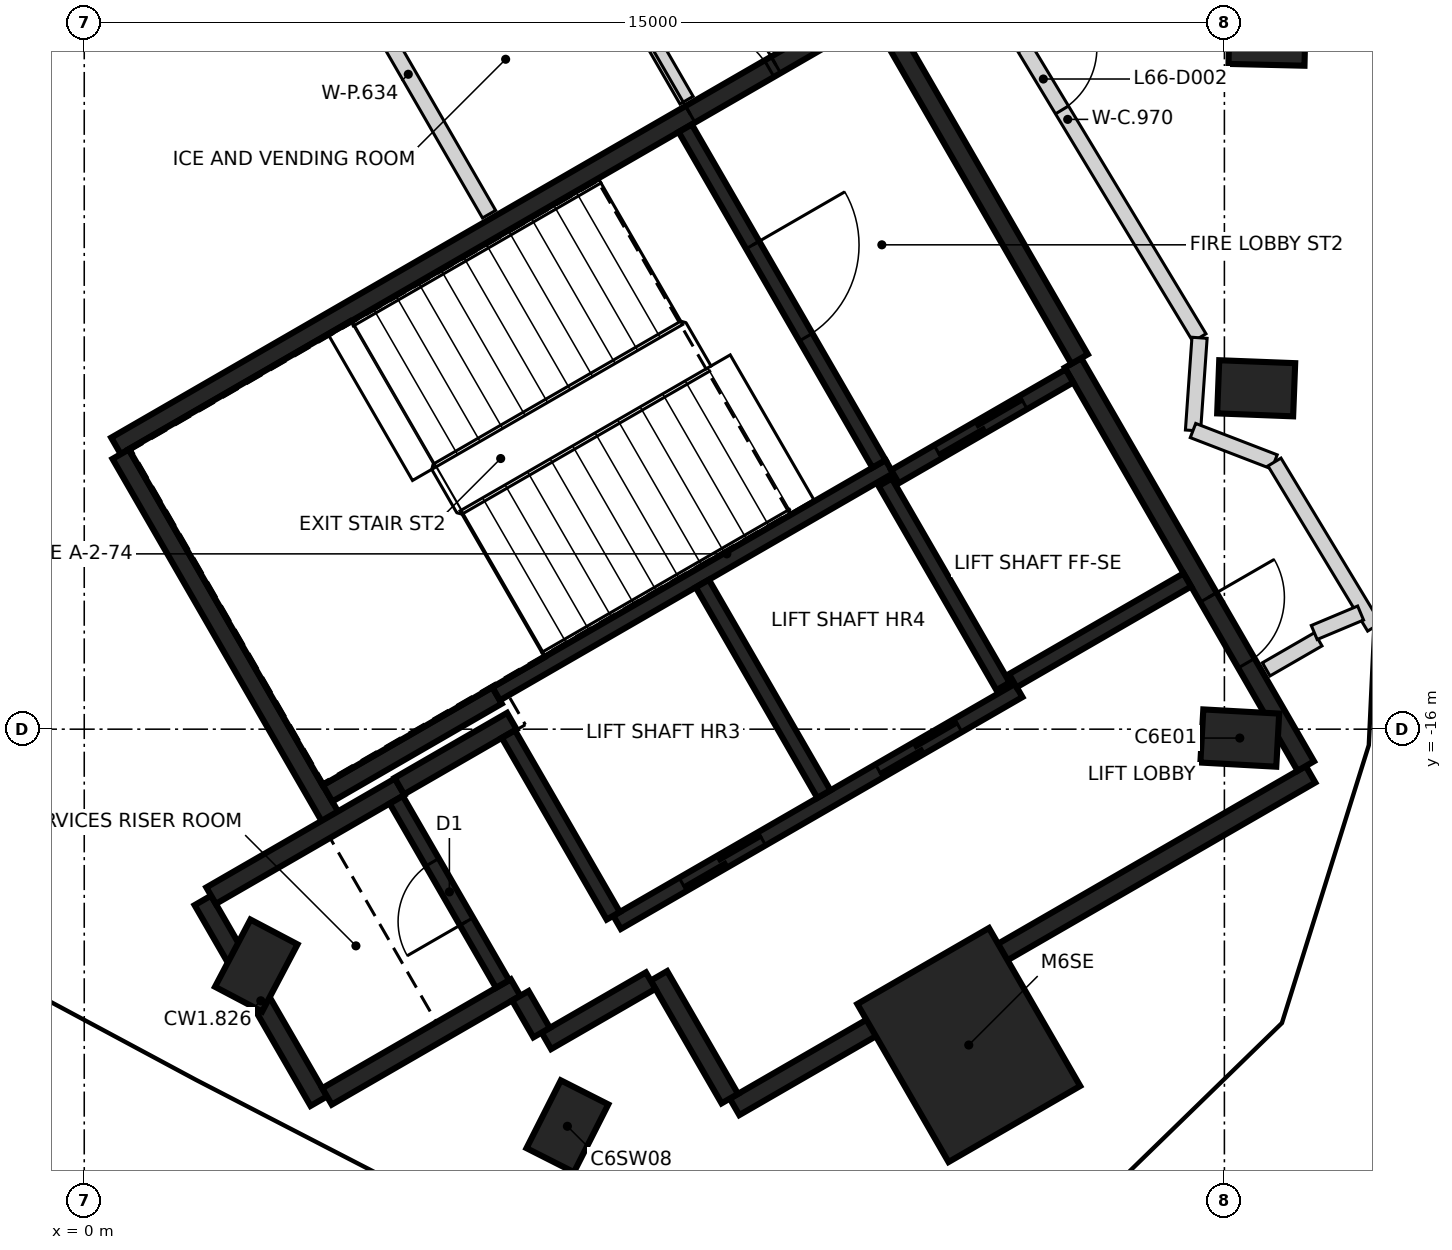
"""IFC4 building model, lengths in metres.
Left out: names, types, materials, properties, quantities, classifications, styles, units other than length and angle.
Written with IfcOpenShell. Run it as: python <this file> out.ifc"""

import sys

from ifc_helpers import new_model, si_unit, direction, frame, frame_2d, origin, origin_2d, place, context, subcontext, project, spatial, rectangle, extrude, element, fill, save


model = new_model("IFC4")
c1 = context("Model", 3, precision=1e-05, world=origin(), true_north=direction((0.0, 1.0)))
c2 = subcontext(c1, "Body", "Model", "MODEL_VIEW")
j1 = project(units=[si_unit("LENGTHUNIT", "METRE"), si_unit("PLANEANGLEUNIT", "RADIAN")], contexts=[c1])
p1 = place(None, origin())
s1 = spatial("IfcSite", under=j1, at=p1, CompositionType="ELEMENT")
p2 = place(p1, origin())
s2 = spatial("IfcBuilding", under=s1, at=p2, CompositionType="ELEMENT")
p3 = place(p2, frame((0.0, 0.0, 262.2)))
s3 = spatial("IfcBuildingStorey", under=s2, at=p3, CompositionType="ELEMENT", Elevation=262.2)
for number, where, z_axis, x_axis in (
    (1, (15.202, -16.117, -0.35), (0.0, 0.0, 1.0), (-0.998, 0.055, 0.0)),
    (2, (15.418, -11.515, -0.35), (0.0, 0.0, 1.0), (-0.999, 0.039, 0.0)),
    (3, (15.562, -6.91, -0.35), (0.0, 0.0, 1.0), (-1.0, 0.024, 0.0)),
    (4, (2.263, -19.11, -0.35), (0.0, 0.0, 1.0), (0.466, 0.885, 0.0)),
    (5, (6.356, -21.224, -0.35), (0.0, 0.0, 1.0), (0.452, 0.892, 0.0)),
):
    element("IfcColumn", number, at=place(p3, frame(where, z_axis=z_axis, x_axis=x_axis)), inside=s3, PredefinedType="COLUMN", context=c2, shape_type="SweptSolid", body=[
        extrude(rectangle(XDim=1.0, YDim=0.7, at=origin_2d()), origin(), (0.0, 0.0, 1.0), 3.6),
    ])
p4 = place(p3, frame((11.637, -20.155, -0.35), z_axis=(0.0, 0.0, 1.0), x_axis=(-0.5, 0.866025403784, 0.0)))
e6 = element("IfcColumn", 6, at=p4, inside=s3, PredefinedType="COLUMN", context=c2, shape_type="SweptSolid", body=[
    extrude(rectangle(XDim=2.4, YDim=2.0, at=origin_2d()), origin(), (0.0, 0.0, 1.0), 3.6),
])
p5 = place(p3, frame((0.417, -12.273, 0.0), z_axis=(0.0, 0.0, 1.0), x_axis=(0.866021906294, 0.500006057782, 0.0)))
e7 = element("IfcWall", 7, at=p5, inside=s3, PredefinedType="SHEAR", context=c2, shape_type="SweptSolid", body=[
    extrude(rectangle(XDim=11.55, YDim=0.25, at=frame_2d((5.775, 0.0))), origin(), (0.0, 0.0, 1.0), 3.25),
])
p6 = place(p5, frame((10.025, 0.0, 0.0)))
e8 = element("IfcOpeningElement", 8, at=p6, cuts=e7, PredefinedType="OPENING", context=c2, shape_type="SweptSolid", body=[
    extrude(rectangle(XDim=1.2, YDim=2.1, at=frame_2d((0.6, 1.05))), frame((0.0, 0.135, 0.0), z_axis=(0.0, -1.0, 0.0), x_axis=(1.0, 0.0, 0.0)), (0.0, 0.0, 1.0), 0.27),
])
p7 = place(p5, frame((8.725, 0.0, 0.0)))
e9 = element("IfcOpeningElement", 9, at=p7, cuts=e7, PredefinedType="OPENING", context=c2, shape_type="SweptSolid", body=[
    extrude(rectangle(XDim=1.2, YDim=2.1, at=frame_2d((0.6, 1.05))), frame((0.0, 0.135, 0.0), z_axis=(0.0, -1.0, 0.0), x_axis=(1.0, 0.0, 0.0)), (0.0, 0.0, 1.0), 0.27),
])
p8 = place(p3, frame((16.133, -16.594, 0.0), z_axis=(0.0, 0.0, 1.0), x_axis=(-0.866022959057, -0.500004234368, 0.0)))
e10 = element("IfcWall", 10, at=p8, inside=s3, PredefinedType="SHEAR", context=c2, shape_type="SweptSolid", body=[
    extrude(rectangle(XDim=8.75, YDim=0.25, at=frame_2d((4.375, 0.0))), origin(), (0.0, 0.0, 1.0), 3.25),
])
p9 = place(p3, frame((13.008, -11.181, 0.0), z_axis=(0.0, 0.0, 1.0), x_axis=(0.500001955336, -0.866024274868, 0.0)))
e11 = element("IfcWall", 11, at=p9, inside=s3, PredefinedType="SHEAR", context=c2, shape_type="SweptSolid", body=[
    extrude(rectangle(XDim=6.125, YDim=0.25, at=frame_2d((3.062, 0.0))), origin(), (0.0, 0.0, 1.0), 3.25),
])
p10 = place(p9, frame((3.563, 0.0, 0.0)))
e12 = element("IfcOpeningElement", 12, at=p10, cuts=e11, PredefinedType="OPENING", context=c2, shape_type="SweptSolid", body=[
    extrude(rectangle(XDim=1.0, YDim=2.1, at=frame_2d((0.5, 1.05))), frame((0.0, 0.135, 0.0), z_axis=(0.0, -1.0, 0.0), x_axis=(1.0, 0.0, 0.0)), (0.0, 0.0, 1.0), 0.27),
])
p11 = place(p3, frame((3.235, -17.153, 0.0), z_axis=(0.0, 0.0, 1.0), x_axis=(-0.500008851346, 0.866020293397, 0.0)))
e13 = element("IfcWall", 13, at=p11, inside=s3, PredefinedType="SHEAR", context=c2, shape_type="SweptSolid", body=[
    extrude(rectangle(XDim=5.51, YDim=0.25, at=frame_2d((2.755, 0.0))), origin(), (0.0, 0.0, 1.0), 3.25),
])
p12 = place(p3, frame((10.483, -6.606, 0.0), z_axis=(0.0, 0.0, 1.0), x_axis=(0.49999885962, -0.866026062182, 0.0)))
e14 = element("IfcWall", 14, at=p12, inside=s3, PredefinedType="SHEAR", context=c2, shape_type="SweptSolid", body=[
    extrude(rectangle(XDim=5.225, YDim=0.25, at=frame_2d((2.612, 0.0))), origin(), (0.0, 0.0, 1.0), 3.25),
])
p13 = place(p3, frame((3.085, -20.894, 0.0), z_axis=(0.0, 0.0, 1.0), x_axis=(-0.499978833458, 0.866037623948, 0.0)))
e15 = element("IfcWall", 15, at=p13, inside=s3, PredefinedType="SHEAR", context=c2, shape_type="SweptSolid", body=[
    extrude(rectangle(XDim=3.05, YDim=0.25, at=frame_2d((1.525, 0.0))), origin(), (0.0, 0.0, 1.0), 3.25),
])
p14 = place(p3, frame((1.669, -18.19, 0.0), z_axis=(0.0, 0.0, 1.0), x_axis=(0.866042235819, 0.499970844928, 0.0)))
e16 = element("IfcWall", 16, at=p14, inside=s3, PredefinedType="SHEAR", context=c2, shape_type="SweptSolid", body=[
    extrude(rectangle(XDim=2.865, YDim=0.25, at=frame_2d((1.432, 0.0))), origin(), (0.0, 0.0, 1.0), 3.25),
])
p15 = place(p3, frame((5.675, -19.399, 0.0), z_axis=(0.0, 0.0, 1.0), x_axis=(-0.866026637627, -0.499997862916, 0.0)))
e17 = element("IfcWall", 17, at=p15, inside=s3, PredefinedType="SHEAR", context=c2, shape_type="SweptSolid", body=[
    extrude(rectangle(XDim=2.865, YDim=0.25, at=frame_2d((1.432, 0.0))), origin(), (0.0, 0.0, 1.0), 3.25),
])
p16 = place(p3, frame((5.431, -15.556, 0.0), z_axis=(0.0, 0.0, 1.0), x_axis=(-0.866022940537, -0.500004266446, 0.0)))
e18 = element("IfcWall", 18, at=p16, inside=s3, PredefinedType="SHEAR", context=c2, shape_type="SweptSolid", body=[
    extrude(rectangle(XDim=2.575, YDim=0.25, at=frame_2d((1.287, 0.0))), origin(), (0.0, 0.0, 1.0), 3.25),
])
p17 = place(p3, frame((8.493, -20.86, 0.0), z_axis=(0.0, 0.0, 1.0), x_axis=(-0.500039802285, 0.866002422705, 0.0)))
e19 = element("IfcWall", 19, at=p17, inside=s3, PredefinedType="SHEAR", context=c2, shape_type="SweptSolid", body=[
    extrude(rectangle(XDim=1.865, YDim=0.25, at=frame_2d((0.932, 0.0))), origin(), (0.0, 0.0, 1.0), 3.25),
])
p18 = place(p3, frame((4.145, -16.749, 0.0), z_axis=(0.0, 0.0, 1.0), x_axis=(0.866038183914, 0.499977863513, 0.0)))
e20 = element("IfcWall", 20, at=p18, inside=s3, PredefinedType="SHEAR", context=c2, shape_type="SweptSolid", body=[
    extrude(rectangle(XDim=1.71, YDim=0.25, at=frame_2d((0.855, 0.0))), origin(), (0.0, 0.0, 1.0), 3.25),
])
p19 = place(p3, frame((7.452, -19.308, 0.0), z_axis=(0.0, 0.0, 1.0), x_axis=(-0.866044474677, -0.49996696679, 0.0)))
e21 = element("IfcWall", 21, at=p19, inside=s3, PredefinedType="SHEAR", context=c2, shape_type="SweptSolid", body=[
    extrude(rectangle(XDim=1.584, YDim=0.25, at=frame_2d((0.792, 0.0))), origin(), (0.0, 0.0, 1.0), 3.25),
])
p20 = place(p3, frame((6.017, -19.992, 0.0), z_axis=(0.0, 0.0, 1.0), x_axis=(-0.500364886717, 0.865814633822, 0.0)))
e22 = element("IfcWall", 22, at=p20, inside=s3, PredefinedType="SHEAR", context=c2, shape_type="SweptSolid", body=[
    extrude(rectangle(XDim=0.559, YDim=0.25, at=frame_2d((0.28, 0.0))), origin(), (0.0, 0.0, 1.0), 3.25),
])
p21 = place(p3, frame((5.419, -15.534, 0.0), z_axis=(0.0, 0.0, 1.0), x_axis=(0.866029065029, 0.499993658486, 0.0)))
e23 = element("IfcWall", 23, at=p21, inside=s3, PredefinedType="SHEAR", context=c2, shape_type="SweptSolid", body=[
    extrude(rectangle(XDim=5.974, YDim=0.2, at=frame_2d((2.987, 0.0))), origin(), (0.0, 0.0, 1.0), 3.25),
])
p22 = place(p3, frame((7.01, -18.542, 0.0), z_axis=(0.0, 0.0, 1.0), x_axis=(0.866030299012, 0.499991521122, 0.0)))
e24 = element("IfcWall", 24, at=p22, inside=s3, PredefinedType="SHEAR", context=c2, shape_type="SweptSolid", body=[
    extrude(rectangle(XDim=6.1, YDim=0.2, at=frame_2d((3.05, 0.0))), origin(), (0.0, 0.0, 1.0), 3.25),
])
p23 = place(p22, frame((1.0, 0.0, 0.0)))
e25 = element("IfcOpeningElement", 25, at=p23, cuts=e24, PredefinedType="OPENING", context=c2, shape_type="SweptSolid", body=[
    extrude(rectangle(XDim=1.2, YDim=2.1, at=frame_2d((0.6, 1.05))), frame((0.0, 0.11, 0.0), z_axis=(0.0, -1.0, 0.0), x_axis=(1.0, 0.0, 0.0)), (0.0, 0.0, 1.0), 0.22),
])
p24 = place(p22, frame((3.982, 0.0, 0.0)))
e26 = element("IfcOpeningElement", 26, at=p24, cuts=e24, PredefinedType="OPENING", context=c2, shape_type="SweptSolid", body=[
    extrude(rectangle(XDim=1.2, YDim=2.1, at=frame_2d((0.6, 1.05))), frame((0.0, 0.11, 0.0), z_axis=(0.0, -1.0, 0.0), x_axis=(1.0, 0.0, 0.0)), (0.0, 0.0, 1.0), 0.22),
])
p25 = place(p3, frame((7.906, -8.094, 0.0), z_axis=(0.0, 0.0, 1.0), x_axis=(0.500027839223, -0.866009330205, 0.0)))
e27 = element("IfcWall", 27, at=p25, inside=s3, PredefinedType="SHEAR", context=c2, shape_type="SweptSolid", body=[
    extrude(rectangle(XDim=5.098, YDim=0.2, at=frame_2d((2.549, 0.0))), origin(), (0.0, 0.0, 1.0), 3.25),
])
p26 = place(p25, frame((1.774, 0.0, 0.0)))
e28 = element("IfcOpeningElement", 28, at=p26, cuts=e27, PredefinedType="OPENING", context=c2, shape_type="SweptSolid", body=[
    extrude(rectangle(XDim=1.4, YDim=2.1, at=frame_2d((0.7, 1.05))), frame((0.0, 0.11, 0.0), z_axis=(0.0, -1.0, 0.0), x_axis=(1.0, 0.0, 0.0)), (0.0, 0.0, 1.0), 0.22),
])
p27 = place(p3, frame((8.132, -14.084, 0.0), z_axis=(0.0, 0.0, 1.0), x_axis=(0.499997778408, -0.866026686418, 0.0)))
e29 = element("IfcWall", 29, at=p27, inside=s3, PredefinedType="SHEAR", context=c2, shape_type="SweptSolid", body=[
    extrude(rectangle(XDim=3.198, YDim=0.2, at=frame_2d((1.599, 0.0))), origin(), (0.0, 0.0, 1.0), 3.25),
])
p28 = place(p3, frame((5.503, -19.352, 0.0), z_axis=(0.0, 0.0, 1.0), x_axis=(-0.499986818241, 0.866033014143, 0.0)))
e30 = element("IfcWall", 30, at=p28, inside=s3, PredefinedType="SHEAR", context=c2, shape_type="SweptSolid", body=[
    extrude(rectangle(XDim=2.798, YDim=0.2, at=frame_2d((1.399, 0.0))), origin(), (0.0, 0.0, 1.0), 3.25),
])
p29 = place(p28, frame((0.949, 0.0, 0.0)))
e31 = element("IfcOpeningElement", 31, at=p29, cuts=e30, PredefinedType="OPENING", context=c2, shape_type="SweptSolid", body=[
    extrude(rectangle(XDim=0.9, YDim=2.1, at=frame_2d((0.45, 1.05))), frame((0.0, 0.11, 0.0), z_axis=(0.0, -1.0, 0.0), x_axis=(1.0, 0.0, 0.0)), (0.0, 0.0, 1.0), 0.22),
])
p30 = place(p3, frame((6.96, -18.455, 0.0), z_axis=(0.0, 0.0, 1.0), x_axis=(-0.499926705758, 0.866067716099, 0.0)))
e32 = element("IfcWall", 32, at=p30, inside=s3, PredefinedType="SHEAR", context=c2, shape_type="SweptSolid", body=[
    extrude(rectangle(XDim=2.759, YDim=0.2, at=frame_2d((1.38, 0.0))), origin(), (0.0, 0.0, 1.0), 3.25),
])
p31 = place(p3, frame((12.088, -15.437, 0.0), z_axis=(0.0, 0.0, 1.0), x_axis=(-0.500026960575, 0.86600983753, 0.0)))
e33 = element("IfcWall", 33, at=p31, inside=s3, PredefinedType="SHEAR", context=c2, shape_type="SweptSolid", body=[
    extrude(rectangle(XDim=3.1, YDim=0.2, at=frame_2d((1.55, 0.0))), origin(), (0.0, 0.0, 1.0), 3.25),
])
p32 = place(p3, frame((10.666, -12.678, 0.0), z_axis=(0.0, 0.0, 1.0), x_axis=(0.866018407898, 0.500012117035, 0.0)))
e34 = element("IfcWall", 34, at=p32, inside=s3, PredefinedType="SHEAR", context=c2, shape_type="SweptSolid", body=[
    extrude(rectangle(XDim=2.651, YDim=0.2, at=frame_2d((1.325, 0.0))), origin(), (0.0, 0.0, 1.0), 3.25),
])
p33 = place(p32, frame((0.652, 0.0, 0.0)))
e35 = element("IfcOpeningElement", 35, at=p33, cuts=e34, PredefinedType="OPENING", context=c2, shape_type="SweptSolid", body=[
    extrude(rectangle(XDim=1.3, YDim=2.1, at=frame_2d((0.65, 1.05))), frame((0.0, 0.11, 0.0), z_axis=(0.0, -1.0, 0.0), x_axis=(1.0, 0.0, 0.0)), (0.0, 0.0, 1.0), 0.22),
])
p34 = place(p3, frame((14.512, -14.037, 0.0), z_axis=(0.0, 0.0, 1.0), x_axis=(-0.866018407898, -0.500012117035, 0.0)))
e36 = element("IfcWall", 36, at=p34, inside=s3, PredefinedType="SHEAR", context=c2, shape_type="SweptSolid", body=[
    extrude(rectangle(XDim=2.651, YDim=0.2, at=frame_2d((1.325, 0.0))), origin(), (0.0, 0.0, 1.0), 3.25),
])
p35 = place(p3, frame((7.427, -6.864, 0.0), z_axis=(0.0, 0.0, 1.0), x_axis=(0.499942098031, -0.866058830921, 0.0)))
e37 = element("IfcWall", 37, at=p35, inside=s3, PredefinedType="PARTITIONING", context=c2, shape_type="SweptSolid", body=[
    extrude(rectangle(XDim=0.994, YDim=0.2, at=frame_2d((0.497, 0.0))), origin(), (0.0, 0.0, 1.0), 3.25),
])
p36 = place(p3, frame((11.205, -5.105, 0.0), z_axis=(0.0, 0.0, 1.0), x_axis=(0.516682442017, -0.856177116087, 0.0)))
e38 = element("IfcWall", 38, at=p36, inside=s3, PredefinedType="PARTITIONING", context=c2, shape_type="SweptSolid", body=[
    extrude(rectangle(XDim=6.71, YDim=0.2, at=frame_2d((3.355, 0.0))), origin(), (0.0, 0.0, 1.0), 3.25),
])
p37 = place(p36, frame((2.26, 0.0, 0.0)))
e39 = element("IfcOpeningElement", 39, at=p37, cuts=e38, PredefinedType="OPENING", context=c2, shape_type="SweptSolid", body=[
    extrude(rectangle(XDim=0.95, YDim=2.1, at=frame_2d((0.475, 1.05))), frame((0.0, 0.11, 0.0), z_axis=(0.0, -1.0, 0.0), x_axis=(1.0, 0.0, 0.0)), (0.0, 0.0, 1.0), 0.22),
])
p38 = place(p3, frame((14.587, -12.071, 0.0), z_axis=(0.0, 0.0, 1.0), x_axis=(0.070466777423, 0.997514126857, 0.0)))
e40 = element("IfcWall", 40, at=p38, inside=s3, PredefinedType="PARTITIONING", context=c2, shape_type="SweptSolid", body=[
    extrude(rectangle(XDim=1.223, YDim=0.2, at=frame_2d((0.611, 0.0))), origin(), (0.0, 0.0, 1.0), 3.25),
])
p39 = place(p3, frame((14.587, -12.071, 0.0), z_axis=(0.0, 0.0, 1.0), x_axis=(0.933192153307, -0.359377802606, 0.0)))
e41 = element("IfcWall", 41, at=p39, inside=s3, PredefinedType="PARTITIONING", context=c2, shape_type="SweptSolid", body=[
    extrude(rectangle(XDim=1.149, YDim=0.2, at=frame_2d((0.574, 0.0))), origin(), (0.0, 0.0, 1.0), 2.35),
])
p40 = place(p3, frame((15.55, -15.213, 0.0), z_axis=(0.0, 0.0, 1.0), x_axis=(0.865989998118, 0.500061319399, 0.0)))
e42 = element("IfcWall", 42, at=p40, inside=s3, PredefinedType="PARTITIONING", context=c2, shape_type="SweptSolid", body=[
    extrude(rectangle(XDim=0.79, YDim=0.2, at=frame_2d((0.395, 0.0))), origin(), (0.0, 0.0, 1.0), 3.25),
])
p41 = place(p3, frame((15.659, -12.485, 0.0), z_axis=(0.0, 0.0, 1.0), x_axis=(0.516729412104, -0.856148769003, 0.0)))
e43 = element("IfcWall", 43, at=p41, inside=s3, PredefinedType="PARTITIONING", context=c2, shape_type="SweptSolid", body=[
    extrude(rectangle(XDim=2.538, YDim=0.2, at=frame_2d((1.269, 0.0))), origin(), (0.0, 0.0, 1.0), 3.25),
])
p42 = place(p3, frame((16.182, -14.728, 0.0), z_axis=(0.0, 0.0, 1.0), x_axis=(0.922058491377, 0.387050563207, 0.0)))
e44 = element("IfcWall", 44, at=p42, inside=s3, PredefinedType="PARTITIONING", context=c2, shape_type="SweptSolid", body=[
    extrude(rectangle(XDim=0.662, YDim=0.2, at=frame_2d((0.331, 0.0))), origin(), (0.0, 0.0, 1.0), 3.25),
])
p43 = place(p3, frame((3.2, -5.543, 0.0), z_axis=(0.0, 0.0, 1.0), x_axis=(0.500060428066, -0.865990512813, 0.0)))
e45 = element("IfcWall", 45, at=p43, inside=s3, PredefinedType="PARTITIONING", context=c2, shape_type="SweptSolid", body=[
    extrude(rectangle(XDim=4.252, YDim=0.2, at=frame_2d((2.126, 0.0))), origin(), (0.0, 0.0, 1.0), 3.25),
])
p44 = place(p33, origin())
e46 = element("IfcDoor", 46, at=p44, inside=s3, OperationType="SLIDING_TO_RIGHT", PredefinedType="DOOR", context=c2, shape_type="SweptSolid", body=[
    extrude(rectangle(XDim=1.3, YDim=2.1, at=frame_2d((0.65, 1.05))), frame((0.0, 0.025, 0.0), z_axis=(0.0, -1.0, 0.0), x_axis=(1.0, 0.0, 0.0)), (0.0, 0.0, 1.0), 0.05),
])
fill(e35, e46)
p45 = place(p23, origin())
e47 = element("IfcDoor", 47, at=p45, inside=s3, OperationType="DOUBLE_DOOR_SLIDING", PredefinedType="DOOR", context=c2, shape_type="SweptSolid", body=[
    extrude(rectangle(XDim=1.2, YDim=2.1, at=frame_2d((0.6, 1.05))), frame((0.0, 0.025, 0.0), z_axis=(0.0, -1.0, 0.0), x_axis=(1.0, 0.0, 0.0)), (0.0, 0.0, 1.0), 0.05),
])
fill(e25, e47)
p46 = place(p24, origin())
e48 = element("IfcDoor", 48, at=p46, inside=s3, OperationType="DOUBLE_DOOR_SLIDING", PredefinedType="DOOR", context=c2, shape_type="SweptSolid", body=[
    extrude(rectangle(XDim=1.2, YDim=2.1, at=frame_2d((0.6, 1.05))), frame((0.0, 0.025, 0.0), z_axis=(0.0, -1.0, 0.0), x_axis=(1.0, 0.0, 0.0)), (0.0, 0.0, 1.0), 0.05),
])
fill(e26, e48)
p47 = place(p10, origin())
e49 = element("IfcDoor", 49, at=p47, inside=s3, OperationType="SINGLE_SWING_LEFT", PredefinedType="DOOR", context=c2, shape_type="SweptSolid", body=[
    extrude(rectangle(XDim=1.0, YDim=2.1, at=frame_2d((0.5, 1.05))), frame((0.0, 0.025, 0.0), z_axis=(0.0, -1.0, 0.0), x_axis=(1.0, 0.0, 0.0)), (0.0, 0.0, 1.0), 0.05),
])
fill(e12, e49)
p48 = place(p6, origin())
e50 = element("IfcDoor", 50, at=p48, inside=s3, OperationType="SINGLE_SWING_LEFT", PredefinedType="DOOR", context=c2, shape_type="SweptSolid", body=[
    extrude(rectangle(XDim=1.2, YDim=2.1, at=frame_2d((0.6, 1.05))), frame((0.0, 0.025, 0.0), z_axis=(0.0, -1.0, 0.0), x_axis=(1.0, 0.0, 0.0)), (0.0, 0.0, 1.0), 0.05),
])
fill(e8, e50)
p49 = place(p7, origin())
e51 = element("IfcDoor", 51, at=p49, inside=s3, OperationType="SINGLE_SWING_RIGHT", PredefinedType="DOOR", context=c2, shape_type="SweptSolid", body=[
    extrude(rectangle(XDim=1.2, YDim=2.1, at=frame_2d((0.6, 1.05))), frame((0.0, 0.025, 0.0), z_axis=(0.0, -1.0, 0.0), x_axis=(1.0, 0.0, 0.0)), (0.0, 0.0, 1.0), 0.05),
])
fill(e9, e51)
p50 = place(p26, origin())
e52 = element("IfcDoor", 52, at=p50, inside=s3, OperationType="SINGLE_SWING_RIGHT", PredefinedType="DOOR", context=c2, shape_type="SweptSolid", body=[
    extrude(rectangle(XDim=1.4, YDim=2.1, at=frame_2d((0.7, 1.05))), frame((0.0, 0.025, 0.0), z_axis=(0.0, -1.0, 0.0), x_axis=(1.0, 0.0, 0.0)), (0.0, 0.0, 1.0), 0.05),
])
fill(e28, e52)
p51 = place(p29, origin())
e53 = element("IfcDoor", 53, at=p51, inside=s3, OperationType="SINGLE_SWING_LEFT", PredefinedType="DOOR", context=c2, shape_type="SweptSolid", body=[
    extrude(rectangle(XDim=0.9, YDim=2.1, at=frame_2d((0.45, 1.05))), frame((0.0, 0.025, 0.0), z_axis=(0.0, -1.0, 0.0), x_axis=(1.0, 0.0, 0.0)), (0.0, 0.0, 1.0), 0.05),
])
fill(e31, e53)
p52 = place(p37, origin())
e54 = element("IfcDoor", 54, at=p52, inside=s3, OperationType="SINGLE_SWING_LEFT", PredefinedType="DOOR", context=c2, shape_type="SweptSolid", body=[
    extrude(rectangle(XDim=0.95, YDim=2.1, at=frame_2d((0.475, 1.05))), frame((0.0, 0.025, 0.0), z_axis=(0.0, -1.0, 0.0), x_axis=(1.0, 0.0, 0.0)), (0.0, 0.0, 1.0), 0.05),
])
fill(e39, e54)
save(model, sys.argv[1])
